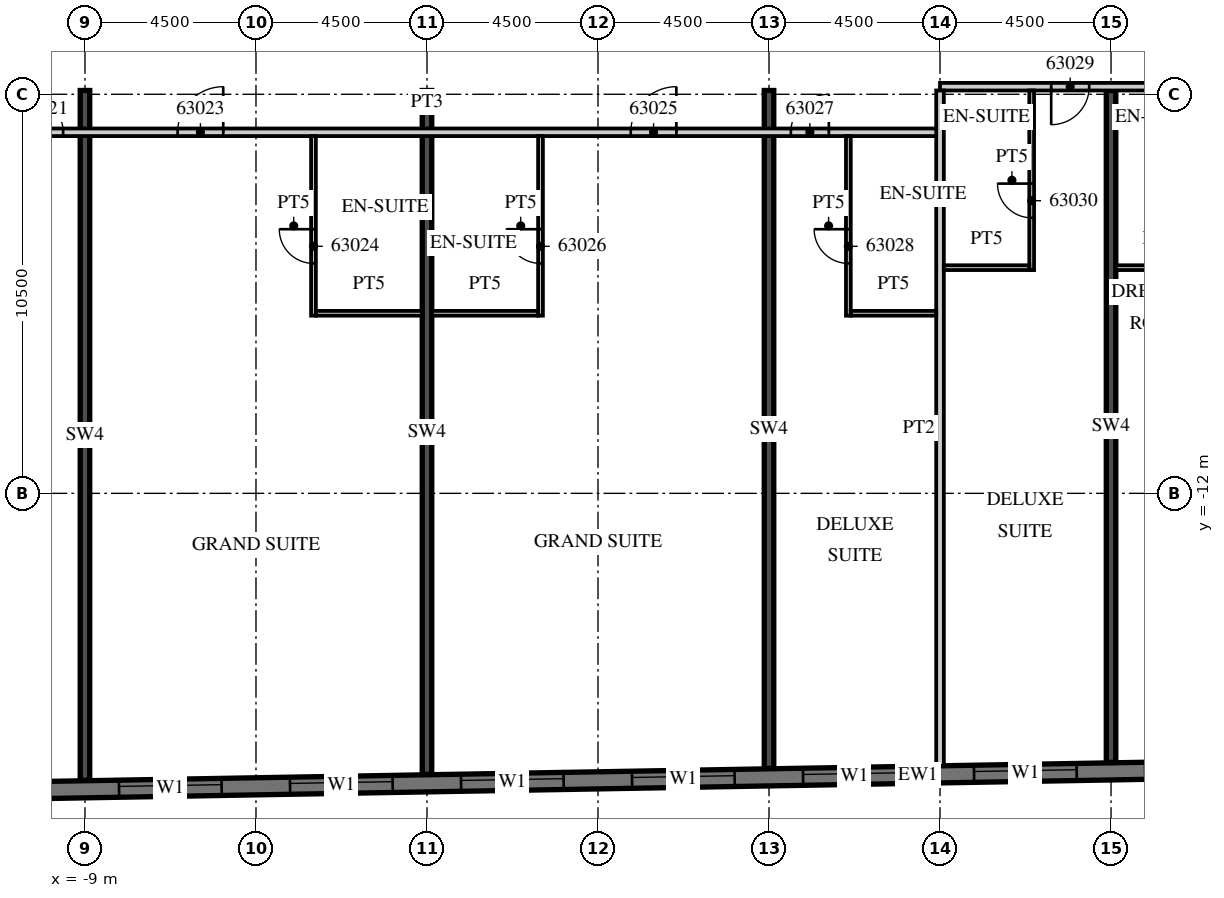
"""IFC4 building model, lengths in metres.
Left out: names, types, materials, properties, quantities, classifications, styles, units other than length and angle.
Written with IfcOpenShell. Run it as: python <this file> out.ifc"""

import sys

from ifc_helpers import new_model, si_unit, direction, frame, frame_2d, origin, place, context, subcontext, project, spatial, rectangle, extrude, element, fill, save


model = new_model("IFC4")
c1 = context("Model", 3, precision=1e-05, world=origin(), true_north=direction((0.0, 1.0)))
c2 = subcontext(c1, "Body", "Model", "MODEL_VIEW")
j1 = project(units=[si_unit("LENGTHUNIT", "METRE"), si_unit("PLANEANGLEUNIT", "RADIAN")], contexts=[c1])
p1 = place(None, origin())
s1 = spatial("IfcSite", under=j1, at=p1, CompositionType="ELEMENT")
p2 = place(p1, origin())
s2 = spatial("IfcBuilding", under=s1, at=p2, CompositionType="ELEMENT")
p3 = place(p2, frame((0.0, 0.0, 254.0)))
s3 = spatial("IfcBuildingStorey", under=s2, at=p3, CompositionType="ELEMENT", Elevation=254.0)
p4 = place(p3, frame((-9.0, -19.55, 0.0), z_axis=(0.0, 0.0, 1.0), x_axis=(0.0, 1.0, 0.0)))
e1 = element("IfcWall", 1, at=p4, inside=s3, PredefinedType="SHEAR", context=c2, shape_type="SweptSolid", body=[
    extrude(rectangle(XDim=18.15, YDim=0.25, at=frame_2d((9.075, 0.0))), origin(), (0.0, 0.0, 1.0), 3.0),
])
p5 = place(p3, frame((0.0, -19.393, 0.0), z_axis=(0.0, 0.0, 1.0), x_axis=(0.0, 1.0, 0.0)))
e2 = element("IfcWall", 2, at=p5, inside=s3, PredefinedType="SHEAR", context=c2, shape_type="SweptSolid", body=[
    extrude(rectangle(XDim=17.993, YDim=0.25, at=frame_2d((8.997, 0.0))), origin(), (0.0, 0.0, 1.0), 3.0),
])
p6 = place(p3, frame((9.0, -19.236, 0.0), z_axis=(0.0, 0.0, 1.0), x_axis=(0.0, 1.0, 0.0)))
e3 = element("IfcWall", 3, at=p6, inside=s3, PredefinedType="SHEAR", context=c2, shape_type="SweptSolid", body=[
    extrude(rectangle(XDim=17.836, YDim=0.25, at=frame_2d((8.918, 0.0))), origin(), (0.0, 0.0, 1.0), 3.0),
])
p7 = place(p3, frame((18.0, -19.079, 0.0), z_axis=(0.0, 0.0, 1.0), x_axis=(0.0, 1.0, 0.0)))
e4 = element("IfcWall", 4, at=p7, inside=s3, PredefinedType="SHEAR", context=c2, shape_type="SweptSolid", body=[
    extrude(rectangle(XDim=17.679, YDim=0.25, at=frame_2d((8.84, 0.0))), origin(), (0.0, 0.0, 1.0), 3.0),
])
p8 = place(p3, frame((-13.504, -19.866, 0.0), z_axis=(0.0, 0.0, 1.0), x_axis=(0.999847672978, 0.017453676992, 0.0)))
e5 = element("IfcWall", 5, at=p8, inside=s3, PredefinedType="SOLIDWALL", context=c2, shape_type="SweptSolid", body=[
    extrude(rectangle(XDim=52.86, YDim=0.45, at=frame_2d((26.43, 0.0))), origin(), (0.0, 0.0, 1.0), 3.0),
])
p9 = place(p8, frame((0.9, 0.0, 0.45)))
e6 = element("IfcOpeningElement", 6, at=p9, cuts=e5, PredefinedType="OPENING", context=c2, shape_type="SweptSolid", body=[
    extrude(rectangle(XDim=2.7, YDim=2.25, at=frame_2d((1.35, 1.125))), frame((0.0, 0.235, 0.0), z_axis=(0.0, -1.0, 0.0), x_axis=(1.0, 0.0, 0.0)), (0.0, 0.0, 1.0), 0.47),
])
p10 = place(p8, frame((5.401, 0.0, 0.45)))
e7 = element("IfcOpeningElement", 7, at=p10, cuts=e5, PredefinedType="OPENING", context=c2, shape_type="SweptSolid", body=[
    extrude(rectangle(XDim=2.7, YDim=2.25, at=frame_2d((1.35, 1.125))), frame((0.0, 0.235, 0.0), z_axis=(0.0, -1.0, 0.0), x_axis=(1.0, 0.0, 0.0)), (0.0, 0.0, 1.0), 0.47),
])
p11 = place(p8, frame((9.902, 0.0, 0.45)))
e8 = element("IfcOpeningElement", 8, at=p11, cuts=e5, PredefinedType="OPENING", context=c2, shape_type="SweptSolid", body=[
    extrude(rectangle(XDim=2.7, YDim=2.25, at=frame_2d((1.35, 1.125))), frame((0.0, 0.235, 0.0), z_axis=(0.0, -1.0, 0.0), x_axis=(1.0, 0.0, 0.0)), (0.0, 0.0, 1.0), 0.47),
])
p12 = place(p8, frame((14.402, 0.0, 0.45)))
e9 = element("IfcOpeningElement", 9, at=p12, cuts=e5, PredefinedType="OPENING", context=c2, shape_type="SweptSolid", body=[
    extrude(rectangle(XDim=2.7, YDim=2.25, at=frame_2d((1.35, 1.125))), frame((0.0, 0.235, 0.0), z_axis=(0.0, -1.0, 0.0), x_axis=(1.0, 0.0, 0.0)), (0.0, 0.0, 1.0), 0.47),
])
p13 = place(p8, frame((18.903, 0.0, 0.45)))
e10 = element("IfcOpeningElement", 10, at=p13, cuts=e5, PredefinedType="OPENING", context=c2, shape_type="SweptSolid", body=[
    extrude(rectangle(XDim=2.7, YDim=2.25, at=frame_2d((1.35, 1.125))), frame((0.0, 0.235, 0.0), z_axis=(0.0, -1.0, 0.0), x_axis=(1.0, 0.0, 0.0)), (0.0, 0.0, 1.0), 0.47),
])
p14 = place(p8, frame((23.404, 0.0, 0.45)))
e11 = element("IfcOpeningElement", 11, at=p14, cuts=e5, PredefinedType="OPENING", context=c2, shape_type="SweptSolid", body=[
    extrude(rectangle(XDim=2.7, YDim=2.25, at=frame_2d((1.35, 1.125))), frame((0.0, 0.235, 0.0), z_axis=(0.0, -1.0, 0.0), x_axis=(1.0, 0.0, 0.0)), (0.0, 0.0, 1.0), 0.47),
])
p15 = place(p8, frame((27.904, 0.0, 0.45)))
e12 = element("IfcOpeningElement", 12, at=p15, cuts=e5, PredefinedType="OPENING", context=c2, shape_type="SweptSolid", body=[
    extrude(rectangle(XDim=2.7, YDim=2.25, at=frame_2d((1.35, 1.125))), frame((0.0, 0.235, 0.0), z_axis=(0.0, -1.0, 0.0), x_axis=(1.0, 0.0, 0.0)), (0.0, 0.0, 1.0), 0.47),
])
p16 = place(p8, frame((32.405, 0.0, 0.45)))
e13 = element("IfcOpeningElement", 13, at=p16, cuts=e5, PredefinedType="OPENING", context=c2, shape_type="SweptSolid", body=[
    extrude(rectangle(XDim=2.7, YDim=2.25, at=frame_2d((1.35, 1.125))), frame((0.0, 0.235, 0.0), z_axis=(0.0, -1.0, 0.0), x_axis=(1.0, 0.0, 0.0)), (0.0, 0.0, 1.0), 0.47),
])
p17 = place(p8, frame((36.906, 0.0, 0.45)))
e14 = element("IfcOpeningElement", 14, at=p17, cuts=e5, PredefinedType="OPENING", context=c2, shape_type="SweptSolid", body=[
    extrude(rectangle(XDim=2.7, YDim=2.25, at=frame_2d((1.35, 1.125))), frame((0.0, 0.235, 0.0), z_axis=(0.0, -1.0, 0.0), x_axis=(1.0, 0.0, 0.0)), (0.0, 0.0, 1.0), 0.47),
])
p18 = place(p8, frame((41.406, 0.0, 0.45)))
e15 = element("IfcOpeningElement", 15, at=p18, cuts=e5, PredefinedType="OPENING", context=c2, shape_type="SweptSolid", body=[
    extrude(rectangle(XDim=2.7, YDim=2.25, at=frame_2d((1.35, 1.125))), frame((0.0, 0.235, 0.0), z_axis=(0.0, -1.0, 0.0), x_axis=(1.0, 0.0, 0.0)), (0.0, 0.0, 1.0), 0.47),
])
p19 = place(p8, frame((45.907, 0.0, 0.45)))
e16 = element("IfcOpeningElement", 16, at=p19, cuts=e5, PredefinedType="OPENING", context=c2, shape_type="SweptSolid", body=[
    extrude(rectangle(XDim=2.7, YDim=2.25, at=frame_2d((1.35, 1.125))), frame((0.0, 0.235, 0.0), z_axis=(0.0, -1.0, 0.0), x_axis=(1.0, 0.0, 0.0)), (0.0, 0.0, 1.0), 0.47),
])
p20 = place(p3, frame((-13.5, -2.5, 0.0), z_axis=(0.0, 0.0, 1.0), x_axis=(1.0, 0.0, 0.0)))
e17 = element("IfcWall", 17, at=p20, inside=s3, PredefinedType="PARTITIONING", context=c2, shape_type="SweptSolid", body=[
    extrude(rectangle(XDim=27.0, YDim=0.2, at=frame_2d((13.5, 0.0))), origin(), (0.0, 0.0, 1.0), 3.0),
])
p21 = place(p20, frame((2.925, 0.0, 0.0)))
e18 = element("IfcOpeningElement", 18, at=p21, cuts=e17, PredefinedType="OPENING", context=c2, shape_type="SweptSolid", body=[
    extrude(rectangle(XDim=1.0, YDim=2.1, at=frame_2d((0.5, 1.05))), frame((0.0, 0.11, 0.0), z_axis=(0.0, -1.0, 0.0), x_axis=(1.0, 0.0, 0.0)), (0.0, 0.0, 1.0), 0.22),
])
p22 = place(p20, frame((6.938, 0.0, 0.0)))
e19 = element("IfcOpeningElement", 19, at=p22, cuts=e17, PredefinedType="OPENING", context=c2, shape_type="SweptSolid", body=[
    extrude(rectangle(XDim=1.2, YDim=2.1, at=frame_2d((0.6, 1.05))), frame((0.0, 0.11, 0.0), z_axis=(0.0, -1.0, 0.0), x_axis=(1.0, 0.0, 0.0)), (0.0, 0.0, 1.0), 0.22),
])
p23 = place(p20, frame((18.862, 0.0, 0.0)))
e20 = element("IfcOpeningElement", 20, at=p23, cuts=e17, PredefinedType="OPENING", context=c2, shape_type="SweptSolid", body=[
    extrude(rectangle(XDim=1.2, YDim=2.1, at=frame_2d((0.6, 1.05))), frame((0.0, 0.11, 0.0), z_axis=(0.0, -1.0, 0.0), x_axis=(1.0, 0.0, 0.0)), (0.0, 0.0, 1.0), 0.22),
])
p24 = place(p20, frame((23.075, 0.0, 0.0)))
e21 = element("IfcOpeningElement", 21, at=p24, cuts=e17, PredefinedType="OPENING", context=c2, shape_type="SweptSolid", body=[
    extrude(rectangle(XDim=1.0, YDim=2.1, at=frame_2d((0.5, 1.05))), frame((0.0, 0.11, 0.0), z_axis=(0.0, -1.0, 0.0), x_axis=(1.0, 0.0, 0.0)), (0.0, 0.0, 1.0), 0.22),
])
p25 = place(p3, frame((13.5, -1.3, 0.0), z_axis=(0.0, 0.0, 1.0), x_axis=(1.0, 0.0, 0.0)))
e22 = element("IfcWall", 22, at=p25, inside=s3, PredefinedType="PARTITIONING", context=c2, shape_type="SweptSolid", body=[
    extrude(rectangle(XDim=29.091, YDim=0.2, at=frame_2d((14.545, 0.0))), origin(), (0.0, 0.0, 1.0), 3.0),
])
p26 = place(p25, frame((2.925, 0.0, 0.0)))
e23 = element("IfcOpeningElement", 23, at=p26, cuts=e22, PredefinedType="OPENING", context=c2, shape_type="SweptSolid", body=[
    extrude(rectangle(XDim=1.0, YDim=2.1, at=frame_2d((0.5, 1.05))), frame((0.0, 0.11, 0.0), z_axis=(0.0, -1.0, 0.0), x_axis=(1.0, 0.0, 0.0)), (0.0, 0.0, 1.0), 0.22),
])
p27 = place(p25, frame((7.45, 0.0, 0.0)))
e24 = element("IfcOpeningElement", 24, at=p27, cuts=e22, PredefinedType="OPENING", context=c2, shape_type="SweptSolid", body=[
    extrude(rectangle(XDim=1.0, YDim=2.1, at=frame_2d((0.5, 1.05))), frame((0.0, 0.11, 0.0), z_axis=(0.0, -1.0, 0.0), x_axis=(1.0, 0.0, 0.0)), (0.0, 0.0, 1.0), 0.22),
])
p28 = place(p25, frame((11.925, 0.0, 0.0)))
e25 = element("IfcOpeningElement", 25, at=p28, cuts=e22, PredefinedType="OPENING", context=c2, shape_type="SweptSolid", body=[
    extrude(rectangle(XDim=1.0, YDim=2.1, at=frame_2d((0.5, 1.05))), frame((0.0, 0.11, 0.0), z_axis=(0.0, -1.0, 0.0), x_axis=(1.0, 0.0, 0.0)), (0.0, 0.0, 1.0), 0.22),
])
p29 = place(p25, frame((15.938, 0.0, 0.0)))
e26 = element("IfcOpeningElement", 26, at=p29, cuts=e22, PredefinedType="OPENING", context=c2, shape_type="SweptSolid", body=[
    extrude(rectangle(XDim=1.2, YDim=2.1, at=frame_2d((0.6, 1.05))), frame((0.0, 0.11, 0.0), z_axis=(0.0, -1.0, 0.0), x_axis=(1.0, 0.0, 0.0)), (0.0, 0.0, 1.0), 0.22),
])
p30 = place(p25, frame((25.425, 0.0, 0.0)))
e27 = element("IfcOpeningElement", 27, at=p30, cuts=e22, PredefinedType="OPENING", context=c2, shape_type="SweptSolid", body=[
    extrude(rectangle(XDim=1.0, YDim=2.1, at=frame_2d((0.5, 1.05))), frame((0.0, 0.11, 0.0), z_axis=(0.0, -1.0, 0.0), x_axis=(1.0, 0.0, 0.0)), (0.0, 0.0, 1.0), 0.22),
])
p31 = place(p25, frame((27.611, 0.0, 0.0)))
e28 = element("IfcOpeningElement", 28, at=p31, cuts=e22, PredefinedType="OPENING", context=c2, shape_type="SweptSolid", body=[
    extrude(rectangle(XDim=1.0, YDim=2.4, at=frame_2d((0.5, 1.2))), frame((0.0, 0.11, 0.0), z_axis=(0.0, -1.0, 0.0), x_axis=(1.0, 0.0, 0.0)), (0.0, 0.0, 1.0), 0.22),
])
p32 = place(p3, frame((-2.987, -7.325, 0.0), z_axis=(0.0, 0.0, 1.0), x_axis=(0.0, 1.0, 0.0)))
e29 = element("IfcWall", 29, at=p32, inside=s3, PredefinedType="PARTITIONING", context=c2, shape_type="SweptSolid", body=[
    extrude(rectangle(XDim=4.725, YDim=0.125, at=frame_2d((2.362, 0.0))), origin(), (0.0, 0.0, 1.0), 3.0),
])
p33 = place(p32, frame((1.375, 0.0, 0.0)))
e30 = element("IfcOpeningElement", 30, at=p33, cuts=e29, PredefinedType="OPENING", context=c2, shape_type="SweptSolid", body=[
    extrude(rectangle(XDim=0.9, YDim=2.1, at=frame_2d((0.45, 1.05))), frame((0.0, 0.073, 0.0), z_axis=(0.0, -1.0, 0.0), x_axis=(1.0, 0.0, 0.0)), (0.0, 0.0, 1.0), 0.145),
])
p34 = place(p3, frame((-2.925, -7.262, 0.0), z_axis=(0.0, 0.0, 1.0), x_axis=(1.0, 0.0, 0.0)))
e31 = element("IfcWall", 31, at=p34, inside=s3, PredefinedType="PARTITIONING", context=c2, shape_type="SweptSolid", body=[
    extrude(rectangle(XDim=2.8, YDim=0.125, at=frame_2d((1.4, 0.0))), origin(), (0.0, 0.0, 1.0), 3.0),
])
p35 = place(p3, frame((2.987, -7.325, 0.0), z_axis=(0.0, 0.0, 1.0), x_axis=(0.0, 1.0, 0.0)))
e32 = element("IfcWall", 32, at=p35, inside=s3, PredefinedType="PARTITIONING", context=c2, shape_type="SweptSolid", body=[
    extrude(rectangle(XDim=4.725, YDim=0.125, at=frame_2d((2.362, 0.0))), origin(), (0.0, 0.0, 1.0), 3.0),
])
p36 = place(p35, frame((1.375, 0.0, 0.0)))
e33 = element("IfcOpeningElement", 33, at=p36, cuts=e32, PredefinedType="OPENING", context=c2, shape_type="SweptSolid", body=[
    extrude(rectangle(XDim=0.9, YDim=2.1, at=frame_2d((0.45, 1.05))), frame((0.0, 0.073, 0.0), z_axis=(0.0, -1.0, 0.0), x_axis=(1.0, 0.0, 0.0)), (0.0, 0.0, 1.0), 0.145),
])
p37 = place(p3, frame((0.125, -7.262, 0.0), z_axis=(0.0, 0.0, 1.0), x_axis=(1.0, 0.0, 0.0)))
e34 = element("IfcWall", 34, at=p37, inside=s3, PredefinedType="PARTITIONING", context=c2, shape_type="SweptSolid", body=[
    extrude(rectangle(XDim=2.8, YDim=0.125, at=frame_2d((1.4, 0.0))), origin(), (0.0, 0.0, 1.0), 3.0),
])
p38 = place(p3, frame((13.5, -19.17, 0.0), z_axis=(0.0, 0.0, 1.0), x_axis=(0.0, 1.0, 0.0)))
e35 = element("IfcWall", 35, at=p38, inside=s3, PredefinedType="PARTITIONING", context=c2, shape_type="SweptSolid", body=[
    extrude(rectangle(XDim=17.77, YDim=0.2, at=frame_2d((8.885, 0.0))), origin(), (0.0, 0.0, 1.0), 3.0),
])
p39 = place(p3, frame((11.088, -7.325, 0.0), z_axis=(0.0, 0.0, 1.0), x_axis=(0.0, 1.0, 0.0)))
e36 = element("IfcWall", 36, at=p39, inside=s3, PredefinedType="PARTITIONING", context=c2, shape_type="SweptSolid", body=[
    extrude(rectangle(XDim=4.725, YDim=0.125, at=frame_2d((2.362, 0.0))), origin(), (0.0, 0.0, 1.0), 3.0),
])
p40 = place(p39, frame((1.375, 0.0, 0.0)))
e37 = element("IfcOpeningElement", 37, at=p40, cuts=e36, PredefinedType="OPENING", context=c2, shape_type="SweptSolid", body=[
    extrude(rectangle(XDim=0.9, YDim=2.1, at=frame_2d((0.45, 1.05))), frame((0.0, 0.073, 0.0), z_axis=(0.0, -1.0, 0.0), x_axis=(1.0, 0.0, 0.0)), (0.0, 0.0, 1.0), 0.145),
])
p41 = place(p3, frame((11.15, -7.262, 0.0), z_axis=(0.0, 0.0, 1.0), x_axis=(1.0, 0.0, 0.0)))
e38 = element("IfcWall", 38, at=p41, inside=s3, PredefinedType="PARTITIONING", context=c2, shape_type="SweptSolid", body=[
    extrude(rectangle(XDim=2.25, YDim=0.125, at=frame_2d((1.125, 0.0))), origin(), (0.0, 0.0, 1.0), 3.0),
])
p42 = place(p3, frame((15.912, -6.125, 0.0), z_axis=(0.0, 0.0, 1.0), x_axis=(0.0, 1.0, 0.0)))
e39 = element("IfcWall", 39, at=p42, inside=s3, PredefinedType="PARTITIONING", context=c2, shape_type="SweptSolid", body=[
    extrude(rectangle(XDim=4.725, YDim=0.125, at=frame_2d((2.363, 0.0))), origin(), (0.0, 0.0, 1.0), 3.0),
])
p43 = place(p42, frame((1.375, 0.0, 0.0)))
e40 = element("IfcOpeningElement", 40, at=p43, cuts=e39, PredefinedType="OPENING", context=c2, shape_type="SweptSolid", body=[
    extrude(rectangle(XDim=0.9, YDim=2.1, at=frame_2d((0.45, 1.05))), frame((0.0, 0.073, 0.0), z_axis=(0.0, -1.0, 0.0), x_axis=(1.0, 0.0, 0.0)), (0.0, 0.0, 1.0), 0.145),
])
for number, where, z_axis, x_axis in (
    (41, (13.6, -6.062, 0.0), (0.0, 0.0, 1.0), (1.0, 0.0, 0.0)),
    (42, (18.125, -6.062, 0.0), (0.0, 0.0, 1.0), (1.0, 0.0, 0.0)),
):
    element("IfcWall", number, at=place(p3, frame(where, z_axis=z_axis, x_axis=x_axis)), inside=s3, PredefinedType="PARTITIONING", context=c2, shape_type="SweptSolid", body=[
        extrude(rectangle(XDim=2.25, YDim=0.125, at=frame_2d((1.125, 0.0))), origin(), (0.0, 0.0, 1.0), 3.0),
    ])
p44 = place(p10, origin())
e43 = element("IfcWindow", 43, at=p44, inside=s3, PartitioningType="SINGLE_PANEL", PredefinedType="WINDOW", context=c2, shape_type="SweptSolid", body=[
    extrude(rectangle(XDim=2.7, YDim=2.25, at=frame_2d((1.35, 1.125))), frame((0.0, 0.09, 0.0), z_axis=(0.0, -1.0, 0.0), x_axis=(1.0, 0.0, 0.0)), (0.0, 0.0, 1.0), 0.06),
])
fill(e7, e43)
p45 = place(p11, origin())
e44 = element("IfcWindow", 44, at=p45, inside=s3, PartitioningType="SINGLE_PANEL", PredefinedType="WINDOW", context=c2, shape_type="SweptSolid", body=[
    extrude(rectangle(XDim=2.7, YDim=2.25, at=frame_2d((1.35, 1.125))), frame((0.0, 0.09, 0.0), z_axis=(0.0, -1.0, 0.0), x_axis=(1.0, 0.0, 0.0)), (0.0, 0.0, 1.0), 0.06),
])
fill(e8, e44)
p46 = place(p12, origin())
e45 = element("IfcWindow", 45, at=p46, inside=s3, PartitioningType="SINGLE_PANEL", PredefinedType="WINDOW", context=c2, shape_type="SweptSolid", body=[
    extrude(rectangle(XDim=2.7, YDim=2.25, at=frame_2d((1.35, 1.125))), frame((0.0, 0.09, 0.0), z_axis=(0.0, -1.0, 0.0), x_axis=(1.0, 0.0, 0.0)), (0.0, 0.0, 1.0), 0.06),
])
fill(e9, e45)
p47 = place(p13, origin())
e46 = element("IfcWindow", 46, at=p47, inside=s3, PartitioningType="SINGLE_PANEL", PredefinedType="WINDOW", context=c2, shape_type="SweptSolid", body=[
    extrude(rectangle(XDim=2.7, YDim=2.25, at=frame_2d((1.35, 1.125))), frame((0.0, 0.09, 0.0), z_axis=(0.0, -1.0, 0.0), x_axis=(1.0, 0.0, 0.0)), (0.0, 0.0, 1.0), 0.06),
])
fill(e10, e46)
p48 = place(p14, origin())
e47 = element("IfcWindow", 47, at=p48, inside=s3, PartitioningType="SINGLE_PANEL", PredefinedType="WINDOW", context=c2, shape_type="SweptSolid", body=[
    extrude(rectangle(XDim=2.7, YDim=2.25, at=frame_2d((1.35, 1.125))), frame((0.0, 0.09, 0.0), z_axis=(0.0, -1.0, 0.0), x_axis=(1.0, 0.0, 0.0)), (0.0, 0.0, 1.0), 0.06),
])
fill(e11, e47)
p49 = place(p15, origin())
e48 = element("IfcWindow", 48, at=p49, inside=s3, PartitioningType="SINGLE_PANEL", PredefinedType="WINDOW", context=c2, shape_type="SweptSolid", body=[
    extrude(rectangle(XDim=2.7, YDim=2.25, at=frame_2d((1.35, 1.125))), frame((0.0, 0.09, 0.0), z_axis=(0.0, -1.0, 0.0), x_axis=(1.0, 0.0, 0.0)), (0.0, 0.0, 1.0), 0.06),
])
fill(e12, e48)
p50 = place(p21, origin())
e49 = element("IfcDoor", 49, at=p50, inside=s3, OperationType="SINGLE_SWING_LEFT", PredefinedType="DOOR", context=c2, shape_type="SweptSolid", body=[
    extrude(rectangle(XDim=1.0, YDim=2.1, at=frame_2d((0.5, 1.05))), frame((0.0, 0.025, 0.0), z_axis=(0.0, -1.0, 0.0), x_axis=(1.0, 0.0, 0.0)), (0.0, 0.0, 1.0), 0.05),
])
fill(e18, e49)
p51 = place(p22, origin())
e50 = element("IfcDoor", 50, at=p51, inside=s3, OperationType="SINGLE_SWING_RIGHT", PredefinedType="DOOR", context=c2, shape_type="SweptSolid", body=[
    extrude(rectangle(XDim=1.2, YDim=2.1, at=frame_2d((0.6, 1.05))), frame((0.0, 0.025, 0.0), z_axis=(0.0, -1.0, 0.0), x_axis=(1.0, 0.0, 0.0)), (0.0, 0.0, 1.0), 0.05),
])
fill(e19, e50)
p52 = place(p33, origin())
e51 = element("IfcDoor", 51, at=p52, inside=s3, OperationType="SINGLE_SWING_RIGHT", PredefinedType="DOOR", context=c2, shape_type="SweptSolid", body=[
    extrude(rectangle(XDim=0.9, YDim=2.1, at=frame_2d((0.45, 1.05))), frame((0.0, 0.025, 0.0), z_axis=(0.0, -1.0, 0.0), x_axis=(1.0, 0.0, 0.0)), (0.0, 0.0, 1.0), 0.05),
])
fill(e30, e51)
p53 = place(p23, origin())
e52 = element("IfcDoor", 52, at=p53, inside=s3, OperationType="SINGLE_SWING_RIGHT", PredefinedType="DOOR", context=c2, shape_type="SweptSolid", body=[
    extrude(rectangle(XDim=1.2, YDim=2.1, at=frame_2d((0.6, 1.05))), frame((0.0, 0.025, 0.0), z_axis=(0.0, -1.0, 0.0), x_axis=(1.0, 0.0, 0.0)), (0.0, 0.0, 1.0), 0.05),
])
fill(e20, e52)
p54 = place(p36, origin())
e53 = element("IfcDoor", 53, at=p54, inside=s3, OperationType="SINGLE_SWING_RIGHT", PredefinedType="DOOR", context=c2, shape_type="SweptSolid", body=[
    extrude(rectangle(XDim=0.9, YDim=2.1, at=frame_2d((0.45, 1.05))), frame((0.0, 0.025, 0.0), z_axis=(0.0, -1.0, 0.0), x_axis=(1.0, 0.0, 0.0)), (0.0, 0.0, 1.0), 0.05),
])
fill(e33, e53)
p55 = place(p24, origin())
e54 = element("IfcDoor", 54, at=p55, inside=s3, OperationType="SINGLE_SWING_RIGHT", PredefinedType="DOOR", context=c2, shape_type="SweptSolid", body=[
    extrude(rectangle(XDim=1.0, YDim=2.1, at=frame_2d((0.5, 1.05))), frame((0.0, 0.025, 0.0), z_axis=(0.0, -1.0, 0.0), x_axis=(1.0, 0.0, 0.0)), (0.0, 0.0, 1.0), 0.05),
])
fill(e21, e54)
p56 = place(p40, origin())
e55 = element("IfcDoor", 55, at=p56, inside=s3, OperationType="SINGLE_SWING_RIGHT", PredefinedType="DOOR", context=c2, shape_type="SweptSolid", body=[
    extrude(rectangle(XDim=0.9, YDim=2.1, at=frame_2d((0.45, 1.05))), frame((0.0, 0.025, 0.0), z_axis=(0.0, -1.0, 0.0), x_axis=(1.0, 0.0, 0.0)), (0.0, 0.0, 1.0), 0.05),
])
fill(e37, e55)
p57 = place(p26, origin())
e56 = element("IfcDoor", 56, at=p57, inside=s3, OperationType="SINGLE_SWING_LEFT", PredefinedType="DOOR", context=c2, shape_type="SweptSolid", body=[
    extrude(rectangle(XDim=1.0, YDim=2.1, at=frame_2d((0.5, 1.05))), frame((0.0, 0.025, 0.0), z_axis=(0.0, -1.0, 0.0), x_axis=(1.0, 0.0, 0.0)), (0.0, 0.0, 1.0), 0.05),
])
fill(e23, e56)
p58 = place(p43, origin())
e57 = element("IfcDoor", 57, at=p58, inside=s3, OperationType="SINGLE_SWING_RIGHT", PredefinedType="DOOR", context=c2, shape_type="SweptSolid", body=[
    extrude(rectangle(XDim=0.9, YDim=2.1, at=frame_2d((0.45, 1.05))), frame((0.0, 0.025, 0.0), z_axis=(0.0, -1.0, 0.0), x_axis=(1.0, 0.0, 0.0)), (0.0, 0.0, 1.0), 0.05),
])
fill(e40, e57)
save(model, sys.argv[1])
